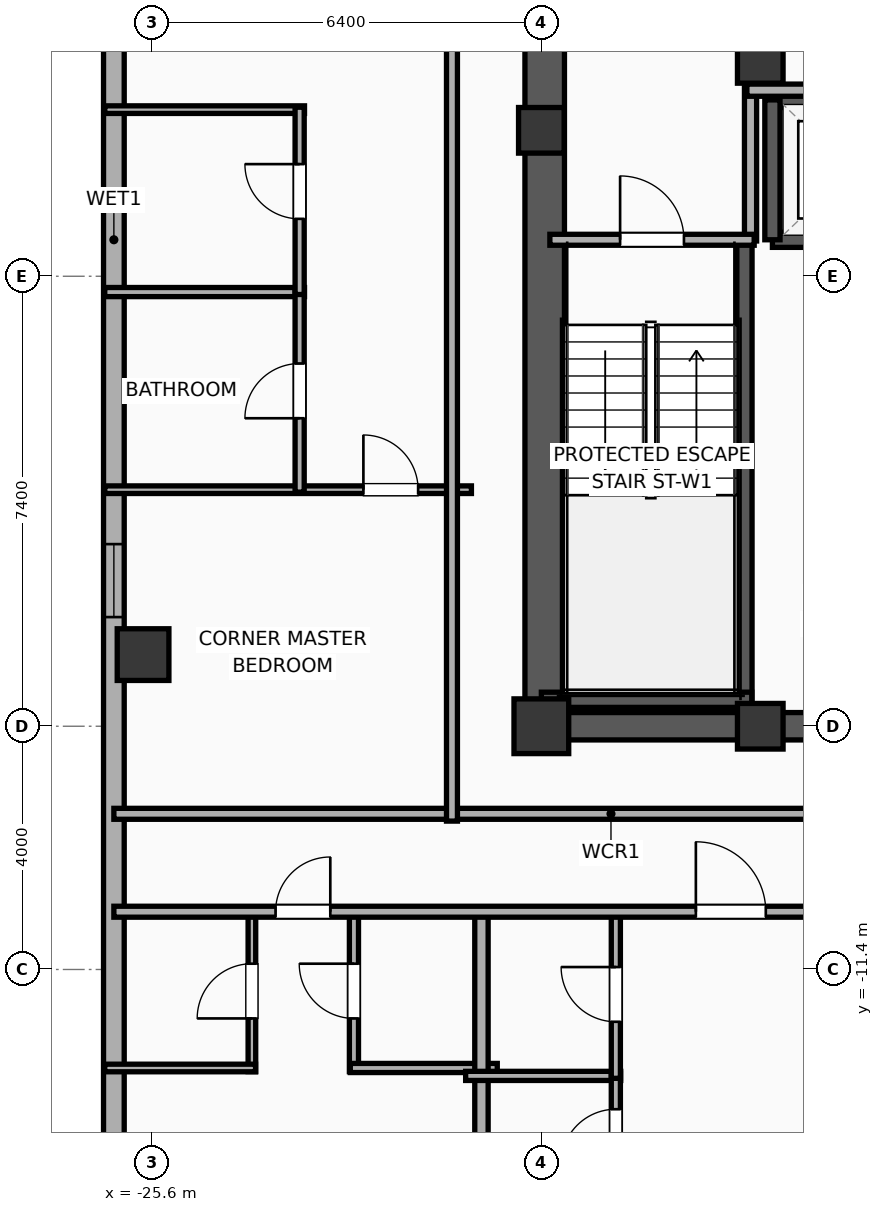
"""IFC4 building model, lengths in metres.
Left out: names, types, materials, properties, quantities, classifications, styles, units other than length and angle.
Written with IfcOpenShell. Run it as: python <this file> out.ifc"""

import sys

from ifc_helpers import new_model, si_unit, direction, frame, frame_2d, origin, origin_2d, place, context, subcontext, project, spatial, rectangle, hollow_rectangle, extrude, element, fill, save


model = new_model("IFC4")
c1 = context("Model", 3, precision=1e-05, world=origin(), true_north=direction((0.0, 1.0)))
c2 = subcontext(c1, "Body", "Model", "MODEL_VIEW")
j1 = project(units=[si_unit("LENGTHUNIT", "METRE"), si_unit("PLANEANGLEUNIT", "RADIAN")], contexts=[c1])
p1 = place(None, origin())
s1 = spatial("IfcSite", under=j1, at=p1, CompositionType="ELEMENT")
p2 = place(p1, origin())
s2 = spatial("IfcBuilding", under=s1, at=p2, CompositionType="ELEMENT")
p3 = place(p2, frame((0.0, 0.0, 239.2)))
s3 = spatial("IfcBuildingStorey", under=s2, at=p3, CompositionType="ELEMENT", Elevation=239.2)
p4 = place(p3, frame((-19.2, -7.4, 0.0), z_axis=(0.0, 0.0, 1.0), x_axis=(1.0, 0.0, 0.0)))
e1 = element("IfcColumn", 1, at=p4, inside=s3, PredefinedType="COLUMN", context=c2, shape_type="SweptSolid", body=[
    extrude(rectangle(XDim=0.9, YDim=0.9, at=origin_2d()), origin(), (0.0, 0.0, 1.0), 3.9),
])
for number, where, z_axis, x_axis in (
    (2, (-19.2, 2.4, 0.0), (0.0, 0.0, 1.0), (1.0, 0.0, 0.0)),
    (3, (-15.6, -7.4, 0.0), (0.0, 0.0, 1.0), (1.0, 0.0, 0.0)),
    (4, (-15.6, 3.55, 0.0), (0.0, 0.0, 1.0), (1.0, 0.0, 0.0)),
):
    element("IfcColumn", number, at=place(p3, frame(where, z_axis=z_axis, x_axis=x_axis)), inside=s3, PredefinedType="COLUMN", context=c2, shape_type="SweptSolid", body=[
        extrude(rectangle(XDim=0.75, YDim=0.75, at=origin_2d()), origin(), (0.0, 0.0, 1.0), 3.9),
    ])
p5 = place(p3, frame((-19.425, -7.4, 0.0), z_axis=(0.0, 0.0, 1.0), x_axis=(1.0, 0.0, 0.0)))
e5 = element("IfcWall", 5, at=p5, inside=s3, PredefinedType="SHEAR", context=c2, shape_type="SweptSolid", body=[
    extrude(rectangle(XDim=7.25, YDim=0.45, at=frame_2d((3.625, 0.0))), origin(), (0.0, 0.0, 1.0), 3.65),
])
p6 = place(p3, frame((-19.145, -7.4, 0.0), z_axis=(0.0, 0.0, 1.0), x_axis=(0.0, 1.0, 0.0)))
e6 = element("IfcWall", 6, at=p6, inside=s3, PredefinedType="SHEAR", context=c2, shape_type="SweptSolid", body=[
    extrude(rectangle(XDim=14.8, YDim=0.65, at=frame_2d((7.4, 0.0))), origin(), (0.0, 0.0, 1.0), 3.65),
])
p7 = place(p3, frame((-15.86, -7.085, 0.0), z_axis=(0.0, 0.0, 1.0), x_axis=(0.0, 1.0, 0.0)))
e7 = element("IfcWall", 7, at=p7, inside=s3, PredefinedType="SOLIDWALL", context=c2, shape_type="SweptSolid", body=[
    extrude(rectangle(XDim=7.685, YDim=0.25, at=frame_2d((3.843, 0.0))), origin(), (0.0, 0.0, 1.0), 3.65),
])
p8 = place(p3, frame((-19.2, -6.965, 0.0), z_axis=(0.0, 0.0, 1.0), x_axis=(1.0, 0.0, 0.0)))
e8 = element("IfcWall", 8, at=p8, inside=s3, PredefinedType="SOLIDWALL", context=c2, shape_type="SweptSolid", body=[
    extrude(rectangle(XDim=3.46, YDim=0.25, at=frame_2d((1.73, 0.0))), origin(), (0.0, 0.0, 1.0), 3.65),
])
p9 = place(p3, frame((-25.75, -6.222, 0.0), z_axis=(0.0, 0.0, 1.0), x_axis=(1.0, 0.0, 0.0)))
e9 = element("IfcColumn", 9, at=p9, inside=s3, PredefinedType="COLUMN", context=c2, shape_type="SweptSolid", body=[
    extrude(hollow_rectangle(XDim=0.85, YDim=0.85, WallThickness=0.028, at=origin_2d()), origin(), (0.0, 0.0, 1.0), 3.9),
])
p10 = place(p3, frame((-26.23, -15.383, 0.0), z_axis=(0.0, 0.0, 1.0), x_axis=(0.0, 1.0, 0.0)))
e10 = element("IfcWall", 10, at=p10, inside=s3, PredefinedType="ELEMENTEDWALL", context=c2, shape_type="SweptSolid", body=[
    extrude(rectangle(XDim=31.967, YDim=0.34, at=frame_2d((15.983, 0.0))), origin(), (0.0, 0.0, 1.0), 3.65),
])
p11 = place(p10, frame((29.431, 0.0, 0.75)))
e11 = element("IfcOpeningElement", 11, at=p11, cuts=e10, PredefinedType="OPENING", context=c2, shape_type="SweptSolid", body=[
    extrude(rectangle(XDim=1.2, YDim=2.05, at=frame_2d((0.6, 1.025))), frame((0.0, 0.18, 0.0), z_axis=(0.0, -1.0, 0.0), x_axis=(1.0, 0.0, 0.0)), (0.0, 0.0, 1.0), 0.36),
])
p12 = place(p10, frame((20.603, 0.0, 0.75)))
e12 = element("IfcOpeningElement", 12, at=p12, cuts=e10, PredefinedType="OPENING", context=c2, shape_type="SweptSolid", body=[
    extrude(rectangle(XDim=1.2, YDim=2.05, at=frame_2d((0.6, 1.025))), frame((0.0, 0.18, 0.0), z_axis=(0.0, -1.0, 0.0), x_axis=(1.0, 0.0, 0.0)), (0.0, 0.0, 1.0), 0.36),
])
p13 = place(p10, frame((9.778, 0.0, 0.75)))
e13 = element("IfcOpeningElement", 13, at=p13, cuts=e10, PredefinedType="OPENING", context=c2, shape_type="SweptSolid", body=[
    extrude(rectangle(XDim=1.2, YDim=2.05, at=frame_2d((0.6, 1.025))), frame((0.0, 0.18, 0.0), z_axis=(0.0, -1.0, 0.0), x_axis=(1.0, 0.0, 0.0)), (0.0, 0.0, 1.0), 0.36),
])
for number, where, z_axis, x_axis in (
    (14, (-15.4, 0.6, 0.0), (0.0, 0.0, 1.0), (1.0, 0.0, 0.0)),
    (15, (-12.4, 2.9, 0.0), (0.0, 0.0, 1.0), (-1.0, 0.0, 0.0)),
):
    element("IfcWall", number, at=place(p3, frame(where, z_axis=z_axis, x_axis=x_axis)), inside=s3, PredefinedType="SOLIDWALL", context=c2, shape_type="SweptSolid", body=[
        extrude(rectangle(XDim=3.0, YDim=0.25, at=frame_2d((1.5, 0.0))), origin(), (0.0, 0.0, 1.0), 3.65),
    ])
p14 = place(p3, frame((-15.4, 2.9, 0.0), z_axis=(0.0, 0.0, 1.0), x_axis=(0.0, -1.0, 0.0)))
e16 = element("IfcWall", 16, at=p14, inside=s3, PredefinedType="SOLIDWALL", context=c2, shape_type="SweptSolid", body=[
    extrude(rectangle(XDim=2.3, YDim=0.25, at=frame_2d((1.15, 0.0))), origin(), (0.0, 0.0, 1.0), 3.65),
])
p15 = place(p3, frame((-15.76, 0.58, 0.0), z_axis=(0.0, 0.0, 1.0), x_axis=(0.0, 1.0, 0.0)))
e17 = element("IfcWall", 17, at=p15, inside=s3, PredefinedType="PARTITIONING", context=c2, shape_type="SweptSolid", body=[
    extrude(rectangle(XDim=2.52, YDim=0.2, at=frame_2d((1.26, 0.0))), origin(), (0.0, 0.0, 1.0), 3.65),
])
p16 = place(p3, frame((-15.82, 3.06, 0.0), z_axis=(0.0, 0.0, 1.0), x_axis=(1.0, 0.0, 0.0)))
e18 = element("IfcWall", 18, at=p16, inside=s3, PredefinedType="PARTITIONING", context=c2, shape_type="SweptSolid", body=[
    extrude(rectangle(XDim=3.16, YDim=0.2, at=frame_2d((1.58, 0.0))), origin(), (0.0, 0.0, 1.0), 3.65),
])
p17 = place(p3, frame((-19.06, 0.6, 0.0), z_axis=(0.0, 0.0, 1.0), x_axis=(1.0, 0.0, 0.0)))
e19 = element("IfcWall", 19, at=p17, inside=s3, PredefinedType="PARTITIONING", context=c2, shape_type="SweptSolid", body=[
    extrude(rectangle(XDim=3.36, YDim=0.18, at=frame_2d((1.68, 0.0))), origin(), (0.0, 0.0, 1.0), 3.65),
])
p18 = place(p17, frame((1.155, 0.0, 0.0)))
e20 = element("IfcOpeningElement", 20, at=p18, cuts=e19, PredefinedType="OPENING", context=c2, shape_type="SweptSolid", body=[
    extrude(rectangle(XDim=1.05, YDim=2.05, at=frame_2d((0.525, 1.025))), frame((0.0, 0.1, 0.0), z_axis=(0.0, -1.0, 0.0), x_axis=(1.0, 0.0, 0.0)), (0.0, 0.0, 1.0), 0.2),
])
p19 = place(p3, frame((-26.23, -8.84, 0.0), z_axis=(0.0, 0.0, 1.0), x_axis=(1.0, 0.0, 0.0)))
e21 = element("IfcWall", 21, at=p19, inside=s3, PredefinedType="PARTITIONING", context=c2, shape_type="SweptSolid", body=[
    extrude(rectangle(XDim=16.35, YDim=0.18, at=frame_2d((8.175, 0.0))), origin(), (0.0, 0.0, 1.0), 3.65),
])
p20 = place(p3, frame((-23.96, -13.08, 0.0), z_axis=(0.0, 0.0, 1.0), x_axis=(0.0, 1.0, 0.0)))
e22 = element("IfcWall", 22, at=p20, inside=s3, PredefinedType="PARTITIONING", context=c2, shape_type="SweptSolid", body=[
    extrude(rectangle(XDim=2.65, YDim=0.125, at=frame_2d((1.325, 0.0))), origin(), (0.0, 0.0, 1.0), 3.65),
])
p21 = place(p20, frame((0.875, 0.0, 0.0)))
e23 = element("IfcOpeningElement", 23, at=p21, cuts=e22, PredefinedType="OPENING", context=c2, shape_type="SweptSolid", body=[
    extrude(rectangle(XDim=0.9, YDim=2.05, at=frame_2d((0.45, 1.025))), frame((0.0, 0.073, 0.0), z_axis=(0.0, -1.0, 0.0), x_axis=(1.0, 0.0, 0.0)), (0.0, 0.0, 1.0), 0.145),
])
p22 = place(p3, frame((-22.282, -13.08, 0.0), z_axis=(0.0, 0.0, 1.0), x_axis=(0.0, 1.0, 0.0)))
e24 = element("IfcWall", 24, at=p22, inside=s3, PredefinedType="PLUMBINGWALL", context=c2, shape_type="SweptSolid", body=[
    extrude(rectangle(XDim=2.65, YDim=0.15, at=frame_2d((1.325, 0.0))), origin(), (0.0, 0.0, 1.0), 3.65),
])
p23 = place(p22, frame((0.875, 0.0, 0.0)))
e25 = element("IfcOpeningElement", 25, at=p23, cuts=e24, PredefinedType="OPENING", context=c2, shape_type="SweptSolid", body=[
    extrude(rectangle(XDim=0.9, YDim=2.05, at=frame_2d((0.45, 1.025))), frame((0.0, 0.085, 0.0), z_axis=(0.0, -1.0, 0.0), x_axis=(1.0, 0.0, 0.0)), (0.0, 0.0, 1.0), 0.17),
])
p24 = place(p3, frame((-26.38, -13.02, 0.0), z_axis=(0.0, 0.0, 1.0), x_axis=(1.0, 0.0, 0.0)))
e26 = element("IfcWall", 26, at=p24, inside=s3, PredefinedType="PARTITIONING", context=c2, shape_type="SweptSolid", body=[
    extrude(rectangle(XDim=2.48, YDim=0.125, at=frame_2d((1.24, 0.0))), origin(), (0.0, 0.0, 1.0), 3.65),
])
p25 = place(p3, frame((-22.342, -13.02, 0.0), z_axis=(0.0, 0.0, 1.0), x_axis=(1.0, 0.0, 0.0)))
e27 = element("IfcWall", 27, at=p25, inside=s3, PredefinedType="PLUMBINGWALL", context=c2, shape_type="SweptSolid", body=[
    extrude(rectangle(XDim=2.417, YDim=0.15, at=frame_2d((1.208, 0.0))), origin(), (0.0, 0.0, 1.0), 3.65),
])
p26 = place(p3, frame((-20.185, -18.83, 0.0), z_axis=(0.0, 0.0, 1.0), x_axis=(0.0, 1.0, 0.0)))
e28 = element("IfcWall", 28, at=p26, inside=s3, PredefinedType="PARTITIONING", context=c2, shape_type="SweptSolid", body=[
    extrude(rectangle(XDim=8.46, YDim=0.22, at=frame_2d((4.23, 0.0))), origin(), (0.0, 0.0, 1.0), 3.09),
])
p27 = place(p3, frame((-20.445, -13.15, 0.0), z_axis=(0.0, 0.0, 1.0), x_axis=(1.0, 0.0, 0.0)))
e29 = element("IfcWall", 29, at=p27, inside=s3, PredefinedType="PLUMBINGWALL", context=c2, shape_type="SweptSolid", body=[
    extrude(rectangle(XDim=2.55, YDim=0.15, at=frame_2d((1.275, 0.0))), origin(), (0.0, 0.0, 1.0), 3.65),
])
p28 = place(p3, frame((-17.975, -18.877, 0.0), z_axis=(0.0, 0.0, 1.0), x_axis=(0.0, 1.0, 0.0)))
e30 = element("IfcWall", 30, at=p28, inside=s3, PredefinedType="PLUMBINGWALL", context=c2, shape_type="SweptSolid", body=[
    extrude(rectangle(XDim=5.767, YDim=0.15, at=frame_2d((2.883, 0.0))), origin(), (0.0, 0.0, 1.0), 3.65),
])
p29 = place(p28, frame((4.279, 0.0, 0.0)))
e31 = element("IfcOpeningElement", 31, at=p29, cuts=e30, PredefinedType="OPENING", context=c2, shape_type="SweptSolid", body=[
    extrude(rectangle(XDim=0.9, YDim=2.05, at=frame_2d((0.45, 1.025))), frame((0.0, 0.085, 0.0), z_axis=(0.0, -1.0, 0.0), x_axis=(1.0, 0.0, 0.0)), (0.0, 0.0, 1.0), 0.17),
])
p30 = place(p3, frame((-17.975, -13.19, 0.0), z_axis=(0.0, 0.0, 1.0), x_axis=(0.0, 1.0, 0.0)))
e32 = element("IfcWall", 32, at=p30, inside=s3, PredefinedType="PLUMBINGWALL", context=c2, shape_type="SweptSolid", body=[
    extrude(rectangle(XDim=2.76, YDim=0.15, at=frame_2d((1.38, 0.0))), origin(), (0.0, 0.0, 1.0), 3.65),
])
p31 = place(p30, frame((0.93, 0.0, 0.0)))
e33 = element("IfcOpeningElement", 33, at=p31, cuts=e32, PredefinedType="OPENING", context=c2, shape_type="SweptSolid", body=[
    extrude(rectangle(XDim=0.9, YDim=2.05, at=frame_2d((0.45, 1.025))), frame((0.0, 0.085, 0.0), z_axis=(0.0, -1.0, 0.0), x_axis=(1.0, 0.0, 0.0)), (0.0, 0.0, 1.0), 0.17),
])
p32 = place(p3, frame((-26.23, -10.45, 0.0), z_axis=(0.0, 0.0, 1.0), x_axis=(1.0, 0.0, 0.0)))
e34 = element("IfcWall", 34, at=p32, inside=s3, PredefinedType="PARTITIONING", context=c2, shape_type="SweptSolid", body=[
    extrude(rectangle(XDim=18.15, YDim=0.18, at=frame_2d((9.075, 0.0))), origin(), (0.0, 0.0, 1.0), 3.65),
])
p33 = place(p32, frame((2.659, 0.0, 0.0)))
e35 = element("IfcOpeningElement", 35, at=p33, cuts=e34, PredefinedType="OPENING", context=c2, shape_type="SweptSolid", body=[
    extrude(rectangle(XDim=0.9, YDim=2.05, at=frame_2d((0.45, 1.025))), frame((0.0, 0.1, 0.0), z_axis=(0.0, -1.0, 0.0), x_axis=(1.0, 0.0, 0.0)), (0.0, 0.0, 1.0), 0.2),
])
p34 = place(p32, frame((9.571, 0.0, 0.0)))
e36 = element("IfcOpeningElement", 36, at=p34, cuts=e34, PredefinedType="OPENING", context=c2, shape_type="SweptSolid", body=[
    extrude(rectangle(XDim=1.15, YDim=2.05, at=frame_2d((0.575, 1.025))), frame((0.0, 0.1, 0.0), z_axis=(0.0, -1.0, 0.0), x_axis=(1.0, 0.0, 0.0)), (0.0, 0.0, 1.0), 0.2),
])
p35 = place(p32, frame((14.792, 0.0, 0.0)))
e37 = element("IfcOpeningElement", 37, at=p35, cuts=e34, PredefinedType="OPENING", context=c2, shape_type="SweptSolid", body=[
    extrude(rectangle(XDim=0.9, YDim=2.05, at=frame_2d((0.45, 1.025))), frame((0.0, 0.1, 0.0), z_axis=(0.0, -1.0, 0.0), x_axis=(1.0, 0.0, 0.0)), (0.0, 0.0, 1.0), 0.2),
])
p36 = place(p3, frame((-26.38, 2.74, 0.0), z_axis=(0.0, 0.0, 1.0), x_axis=(1.0, 0.0, 0.0)))
e38 = element("IfcWall", 38, at=p36, inside=s3, PredefinedType="PARTITIONING", context=c2, shape_type="SweptSolid", body=[
    extrude(rectangle(XDim=3.285, YDim=0.125, at=frame_2d((1.643, 0.0))), origin(), (0.0, 0.0, 1.0), 3.65),
])
p37 = place(p3, frame((-26.38, -0.26, 0.0), z_axis=(0.0, 0.0, 1.0), x_axis=(1.0, 0.0, 0.0)))
e39 = element("IfcWall", 39, at=p37, inside=s3, PredefinedType="PLUMBINGWALL", context=c2, shape_type="SweptSolid", body=[
    extrude(rectangle(XDim=3.285, YDim=0.15, at=frame_2d((1.643, 0.0))), origin(), (0.0, 0.0, 1.0), 3.65),
])
p38 = place(p3, frame((-26.38, -3.51, 0.0), z_axis=(0.0, 0.0, 1.0), x_axis=(1.0, 0.0, 0.0)))
e40 = element("IfcWall", 40, at=p38, inside=s3, PredefinedType="PARTITIONING", context=c2, shape_type="SweptSolid", body=[
    extrude(rectangle(XDim=6.03, YDim=0.125, at=frame_2d((3.015, 0.0))), origin(), (0.0, 0.0, 1.0), 3.65),
])
p39 = place(p38, frame((4.253, 0.0, 0.0)))
e41 = element("IfcOpeningElement", 41, at=p39, cuts=e40, PredefinedType="OPENING", context=c2, shape_type="SweptSolid", body=[
    extrude(rectangle(XDim=0.9, YDim=2.05, at=frame_2d((0.45, 1.025))), frame((0.0, 0.073, 0.0), z_axis=(0.0, -1.0, 0.0), x_axis=(1.0, 0.0, 0.0)), (0.0, 0.0, 1.0), 0.145),
])
p40 = place(p3, frame((-23.175, -3.55, 0.0), z_axis=(0.0, 0.0, 1.0), x_axis=(0.0, 1.0, 0.0)))
e42 = element("IfcWall", 42, at=p40, inside=s3, PredefinedType="PLUMBINGWALL", context=c2, shape_type="SweptSolid", body=[
    extrude(rectangle(XDim=3.33, YDim=0.15, at=frame_2d((1.665, 0.0))), origin(), (0.0, 0.0, 1.0), 3.65),
])
p41 = place(p40, frame((1.215, 0.0, 0.0)))
e43 = element("IfcOpeningElement", 43, at=p41, cuts=e42, PredefinedType="OPENING", context=c2, shape_type="SweptSolid", body=[
    extrude(rectangle(XDim=0.9, YDim=2.05, at=frame_2d((0.45, 1.025))), frame((0.0, 0.085, 0.0), z_axis=(0.0, -1.0, 0.0), x_axis=(1.0, 0.0, 0.0)), (0.0, 0.0, 1.0), 0.17),
])
p42 = place(p3, frame((-23.175, -0.3, 0.0), z_axis=(0.0, 0.0, 1.0), x_axis=(0.0, 1.0, 0.0)))
e44 = element("IfcWall", 44, at=p42, inside=s3, PredefinedType="PLUMBINGWALL", context=c2, shape_type="SweptSolid", body=[
    extrude(rectangle(XDim=3.08, YDim=0.15, at=frame_2d((1.54, 0.0))), origin(), (0.0, 0.0, 1.0), 3.65),
])
p43 = place(p42, frame((1.244, 0.0, 0.0)))
e45 = element("IfcOpeningElement", 45, at=p43, cuts=e44, PredefinedType="OPENING", context=c2, shape_type="SweptSolid", body=[
    extrude(rectangle(XDim=0.9, YDim=2.05, at=frame_2d((0.45, 1.025))), frame((0.0, 0.085, 0.0), z_axis=(0.0, -1.0, 0.0), x_axis=(1.0, 0.0, 0.0)), (0.0, 0.0, 1.0), 0.17),
])
p44 = place(p3, frame((-20.67, -8.96, 0.0), z_axis=(0.0, 0.0, 1.0), x_axis=(0.0, 1.0, 0.0)))
e46 = element("IfcWall", 46, at=p44, inside=s3, PredefinedType="PARTITIONING", context=c2, shape_type="SweptSolid", body=[
    extrude(rectangle(XDim=17.92, YDim=0.18, at=frame_2d((8.96, 0.0))), origin(), (0.0, 0.0, 1.0), 3.65),
])
p45 = place(p13, origin())
e47 = element("IfcWindow", 47, at=p45, inside=s3, PartitioningType="SINGLE_PANEL", PredefinedType="WINDOW", context=c2, shape_type="SweptSolid", body=[
    extrude(rectangle(XDim=1.2, YDim=2.05, at=frame_2d((0.6, 1.025))), frame((0.0, 0.03, 0.0), z_axis=(0.0, -1.0, 0.0), x_axis=(1.0, 0.0, 0.0)), (0.0, 0.0, 1.0), 0.06),
])
fill(e13, e47)
p46 = place(p18, origin())
e48 = element("IfcDoor", 48, at=p46, inside=s3, OperationType="SINGLE_SWING_LEFT", PredefinedType="DOOR", context=c2, shape_type="SweptSolid", body=[
    extrude(rectangle(XDim=1.05, YDim=2.05, at=frame_2d((0.525, 1.025))), frame((0.0, 0.025, 0.0), z_axis=(0.0, -1.0, 0.0), x_axis=(1.0, 0.0, 0.0)), (0.0, 0.0, 1.0), 0.05),
])
fill(e20, e48)
p47 = place(p21, origin())
e49 = element("IfcDoor", 49, at=p47, inside=s3, OperationType="SINGLE_SWING_LEFT", PredefinedType="DOOR", context=c2, shape_type="SweptSolid", body=[
    extrude(rectangle(XDim=0.9, YDim=2.05, at=frame_2d((0.45, 1.025))), frame((0.0, 0.025, 0.0), z_axis=(0.0, -1.0, 0.0), x_axis=(1.0, 0.0, 0.0)), (0.0, 0.0, 1.0), 0.05),
])
fill(e23, e49)
p48 = place(p23, origin())
e50 = element("IfcDoor", 50, at=p48, inside=s3, OperationType="SINGLE_SWING_RIGHT", PredefinedType="DOOR", context=c2, shape_type="SweptSolid", body=[
    extrude(rectangle(XDim=0.9, YDim=2.05, at=frame_2d((0.45, 1.025))), frame((0.0, 0.025, 0.0), z_axis=(0.0, -1.0, 0.0), x_axis=(1.0, 0.0, 0.0)), (0.0, 0.0, 1.0), 0.05),
])
fill(e25, e50)
p49 = place(p29, origin())
e51 = element("IfcDoor", 51, at=p49, inside=s3, OperationType="SINGLE_SWING_LEFT", PredefinedType="DOOR", context=c2, shape_type="SweptSolid", body=[
    extrude(rectangle(XDim=0.9, YDim=2.05, at=frame_2d((0.45, 1.025))), frame((0.0, 0.025, 0.0), z_axis=(0.0, -1.0, 0.0), x_axis=(1.0, 0.0, 0.0)), (0.0, 0.0, 1.0), 0.05),
])
fill(e31, e51)
p50 = place(p31, origin())
e52 = element("IfcDoor", 52, at=p50, inside=s3, OperationType="SINGLE_SWING_RIGHT", PredefinedType="DOOR", context=c2, shape_type="SweptSolid", body=[
    extrude(rectangle(XDim=0.9, YDim=2.05, at=frame_2d((0.45, 1.025))), frame((0.0, 0.025, 0.0), z_axis=(0.0, -1.0, 0.0), x_axis=(1.0, 0.0, 0.0)), (0.0, 0.0, 1.0), 0.05),
])
fill(e33, e52)
p51 = place(p33, origin())
e53 = element("IfcDoor", 53, at=p51, inside=s3, OperationType="SINGLE_SWING_RIGHT", PredefinedType="DOOR", context=c2, shape_type="SweptSolid", body=[
    extrude(rectangle(XDim=0.9, YDim=2.05, at=frame_2d((0.45, 1.025))), frame((0.0, 0.025, 0.0), z_axis=(0.0, -1.0, 0.0), x_axis=(1.0, 0.0, 0.0)), (0.0, 0.0, 1.0), 0.05),
])
fill(e35, e53)
p52 = place(p34, origin())
e54 = element("IfcDoor", 54, at=p52, inside=s3, OperationType="SINGLE_SWING_LEFT", PredefinedType="DOOR", context=c2, shape_type="SweptSolid", body=[
    extrude(rectangle(XDim=1.15, YDim=2.05, at=frame_2d((0.575, 1.025))), frame((0.0, 0.025, 0.0), z_axis=(0.0, -1.0, 0.0), x_axis=(1.0, 0.0, 0.0)), (0.0, 0.0, 1.0), 0.05),
])
fill(e36, e54)
p53 = place(p39, origin())
e55 = element("IfcDoor", 55, at=p53, inside=s3, OperationType="SINGLE_SWING_LEFT", PredefinedType="DOOR", context=c2, shape_type="SweptSolid", body=[
    extrude(rectangle(XDim=0.9, YDim=2.05, at=frame_2d((0.45, 1.025))), frame((0.0, 0.025, 0.0), z_axis=(0.0, -1.0, 0.0), x_axis=(1.0, 0.0, 0.0)), (0.0, 0.0, 1.0), 0.05),
])
fill(e41, e55)
p54 = place(p41, origin())
e56 = element("IfcDoor", 56, at=p54, inside=s3, OperationType="SINGLE_SWING_LEFT", PredefinedType="DOOR", context=c2, shape_type="SweptSolid", body=[
    extrude(rectangle(XDim=0.9, YDim=2.05, at=frame_2d((0.45, 1.025))), frame((0.0, 0.025, 0.0), z_axis=(0.0, -1.0, 0.0), x_axis=(1.0, 0.0, 0.0)), (0.0, 0.0, 1.0), 0.05),
])
fill(e43, e56)
p55 = place(p43, origin())
e57 = element("IfcDoor", 57, at=p55, inside=s3, OperationType="SINGLE_SWING_RIGHT", PredefinedType="DOOR", context=c2, shape_type="SweptSolid", body=[
    extrude(rectangle(XDim=0.9, YDim=2.05, at=frame_2d((0.45, 1.025))), frame((0.0, 0.025, 0.0), z_axis=(0.0, -1.0, 0.0), x_axis=(1.0, 0.0, 0.0)), (0.0, 0.0, 1.0), 0.05),
])
fill(e45, e57)
save(model, sys.argv[1])
